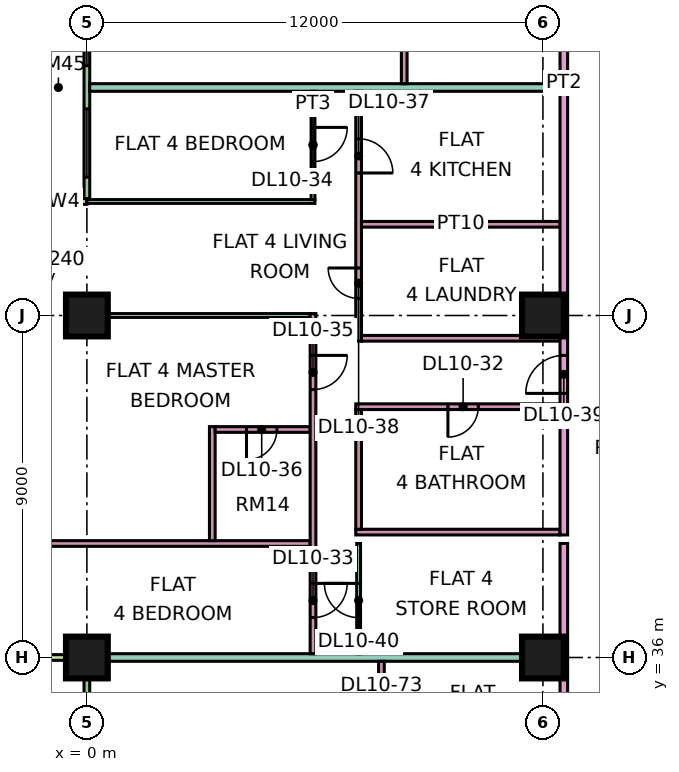
"""IFC4 building model, lengths in metres.
Left out: names, types, materials, properties, quantities, classifications, styles, units other than length and angle.
Written with IfcOpenShell. Run it as: python <this file> out.ifc"""

import sys

from ifc_helpers import new_model, si_unit, direction, frame, frame_2d, origin, origin_2d, place, context, subcontext, project, spatial, rectangle, extrude, element, fill, save


model = new_model("IFC4")
c1 = context("Model", 3, precision=1e-05, world=origin(), true_north=direction((0.0, 1.0)))
c2 = subcontext(c1, "Body", "Model", "MODEL_VIEW")
j1 = project(units=[si_unit("LENGTHUNIT", "METRE"), si_unit("PLANEANGLEUNIT", "RADIAN")], contexts=[c1])
p1 = place(None, origin())
s1 = spatial("IfcSite", under=j1, at=p1, CompositionType="ELEMENT")
p2 = place(p1, origin())
s2 = spatial("IfcBuilding", under=s1, at=p2, CompositionType="ELEMENT")
p3 = place(p2, frame((0.0, 0.0, 52.65)))
s3 = spatial("IfcBuildingStorey", under=s2, at=p3, CompositionType="ELEMENT", Elevation=52.65)
p4 = place(p3, frame((0.0, 36.0, 0.0), z_axis=(0.0, 0.0, 1.0), x_axis=(1.0, 0.0, 0.0)))
e1 = element("IfcColumn", 1, at=p4, inside=s3, PredefinedType="COLUMN", context=c2, shape_type="SweptSolid", body=[
    extrude(rectangle(XDim=1.1, YDim=1.1, at=origin_2d()), origin(), (0.0, 0.0, 1.0), 3.75),
])
p5 = place(p3, frame((0.0, 45.0, 0.0), z_axis=(0.0, 0.0, 1.0), x_axis=(1.0, 0.0, 0.0)))
e2 = element("IfcColumn", 2, at=p5, inside=s3, PredefinedType="COLUMN", context=c2, shape_type="SweptSolid", body=[
    extrude(rectangle(XDim=1.1, YDim=1.1, at=origin_2d()), origin(), (0.0, 0.0, 1.0), 3.75),
])
for number, where, z_axis, x_axis in (
    (3, (12.0, 36.0, 0.0), (0.0, 0.0, 1.0), (1.0, 0.0, 0.0)),
    (4, (12.0, 45.0, 0.0), (0.0, 0.0, 1.0), (1.0, 0.0, 0.0)),
):
    element("IfcColumn", number, at=place(p3, frame(where, z_axis=z_axis, x_axis=x_axis)), inside=s3, PredefinedType="COLUMN", context=c2, shape_type="SweptSolid", body=[
        extrude(rectangle(XDim=1.1, YDim=1.1, at=origin_2d()), origin(), (0.0, 0.0, 1.0), 3.75),
    ])
p6 = place(p3, frame((0.0, 61.425, 0.0), z_axis=(0.0, 0.0, 1.0), x_axis=(0.0, -1.0, 0.0)))
e5 = element("IfcWall", 5, at=p6, inside=s3, PredefinedType="SOLIDWALL", context=c2, shape_type="SweptSolid", body=[
    extrude(rectangle(XDim=13.35, YDim=0.15, at=frame_2d((6.675, 0.0))), origin(), (0.0, 0.0, 1.0), 3.35),
])
p7 = place(p6, frame((1.312, 0.0, 0.0)))
e6 = element("IfcOpeningElement", 6, at=p7, cuts=e5, PredefinedType="OPENING", context=c2, shape_type="SweptSolid", body=[
    extrude(rectangle(XDim=1.8, YDim=2.4, at=frame_2d((0.9, 1.2))), frame((0.0, 0.085, 0.0), z_axis=(0.0, -1.0, 0.0), x_axis=(1.0, 0.0, 0.0)), (0.0, 0.0, 1.0), 0.17),
])
p8 = place(p6, frame((5.0, 0.0, 0.45)))
e7 = element("IfcOpeningElement", 7, at=p8, cuts=e5, PredefinedType="OPENING", context=c2, shape_type="SweptSolid", body=[
    extrude(rectangle(XDim=1.2, YDim=2.4, at=frame_2d((0.6, 1.2))), frame((0.0, 0.085, 0.0), z_axis=(0.0, -1.0, 0.0), x_axis=(1.0, 0.0, 0.0)), (0.0, 0.0, 1.0), 0.17),
])
p9 = place(p6, frame((8.65, 0.0, 0.45)))
e8 = element("IfcOpeningElement", 8, at=p9, cuts=e5, PredefinedType="OPENING", context=c2, shape_type="SweptSolid", body=[
    extrude(rectangle(XDim=1.2, YDim=2.4, at=frame_2d((0.6, 1.2))), frame((0.0, 0.085, 0.0), z_axis=(0.0, -1.0, 0.0), x_axis=(1.0, 0.0, 0.0)), (0.0, 0.0, 1.0), 0.17),
])
p10 = place(p6, frame((10.988, 0.0, 0.45)))
e9 = element("IfcOpeningElement", 9, at=p10, cuts=e5, PredefinedType="OPENING", context=c2, shape_type="SweptSolid", body=[
    extrude(rectangle(XDim=1.8, YDim=2.4, at=frame_2d((0.9, 1.2))), frame((0.0, 0.085, 0.0), z_axis=(0.0, -1.0, 0.0), x_axis=(1.0, 0.0, 0.0)), (0.0, 0.0, 1.0), 0.17),
])
p11 = place(p3, frame((-1.5, 48.0, 0.0), z_axis=(0.0, 0.0, 1.0), x_axis=(1.0, 0.0, 0.0)))
e10 = element("IfcWall", 10, at=p11, inside=s3, PredefinedType="SOLIDWALL", context=c2, shape_type="SweptSolid", body=[
    extrude(rectangle(XDim=1.5, YDim=0.15, at=frame_2d((0.75, 0.0))), origin(), (0.0, 0.0, 1.0), 3.35),
])
p12 = place(p3, frame((0.0, 35.925, 0.0), z_axis=(0.0, 0.0, 1.0), x_axis=(0.0, -1.0, 0.0)))
e11 = element("IfcWall", 11, at=p12, inside=s3, PredefinedType="SOLIDWALL", context=c2, shape_type="SweptSolid", body=[
    extrude(rectangle(XDim=11.85, YDim=0.15, at=frame_2d((5.925, 0.0))), origin(), (0.0, 0.0, 1.0), 3.35),
])
p13 = place(p12, frame((1.15, 0.0, 0.45)))
e12 = element("IfcOpeningElement", 12, at=p13, cuts=e11, PredefinedType="OPENING", context=c2, shape_type="SweptSolid", body=[
    extrude(rectangle(XDim=1.2, YDim=2.4, at=frame_2d((0.6, 1.2))), frame((0.0, 0.085, 0.0), z_axis=(0.0, -1.0, 0.0), x_axis=(1.0, 0.0, 0.0)), (0.0, 0.0, 1.0), 0.17),
])
p14 = place(p12, frame((5.025, 0.0, 0.0)))
e13 = element("IfcOpeningElement", 13, at=p14, cuts=e11, PredefinedType="OPENING", context=c2, shape_type="SweptSolid", body=[
    extrude(rectangle(XDim=1.8, YDim=2.4, at=frame_2d((0.9, 1.2))), frame((0.0, 0.085, 0.0), z_axis=(0.0, -1.0, 0.0), x_axis=(1.0, 0.0, 0.0)), (0.0, 0.0, 1.0), 0.17),
])
p15 = place(p12, frame((9.5, 0.0, 0.45)))
e14 = element("IfcOpeningElement", 14, at=p15, cuts=e11, PredefinedType="OPENING", context=c2, shape_type="SweptSolid", body=[
    extrude(rectangle(XDim=1.2, YDim=2.4, at=frame_2d((0.6, 1.2))), frame((0.0, 0.085, 0.0), z_axis=(0.0, -1.0, 0.0), x_axis=(1.0, 0.0, 0.0)), (0.0, 0.0, 1.0), 0.17),
])
p16 = place(p3, frame((-1.5, 36.0, 0.0), z_axis=(0.0, 0.0, 1.0), x_axis=(1.0, 0.0, 0.0)))
e15 = element("IfcWall", 15, at=p16, inside=s3, PredefinedType="SOLIDWALL", context=c2, shape_type="SweptSolid", body=[
    extrude(rectangle(XDim=1.5, YDim=0.15, at=frame_2d((0.75, 0.0))), origin(), (0.0, 0.0, 1.0), 3.35),
])
p17 = place(p3, frame((-1.351, 39.0, 0.0), z_axis=(0.0, 0.0, 1.0), x_axis=(1.0, 0.0, 0.0)))
e16 = element("IfcWall", 16, at=p17, inside=s3, PredefinedType="PARTITIONING", context=c2, shape_type="SweptSolid", body=[
    extrude(rectangle(XDim=7.226, YDim=0.15, at=frame_2d((3.613, 0.0))), origin(), (0.0, 0.0, 1.0), 3.35),
])
e17 = element("IfcWall", 17, at=p4, inside=s3, PredefinedType="PARTITIONING", context=c2, shape_type="SweptSolid", body=[
    extrude(rectangle(XDim=12.45, YDim=0.2, at=frame_2d((6.225, 0.0))), origin(), (0.0, 0.0, 1.0), 3.35),
])
e18 = element("IfcWall", 18, at=p5, inside=s3, PredefinedType="PARTITIONING", context=c2, shape_type="SweptSolid", body=[
    extrude(rectangle(XDim=5.875, YDim=0.1, at=frame_2d((2.938, 0.0))), origin(), (0.0, 0.0, 1.0), 3.35),
])
p18 = place(p3, frame((0.0, 48.0, 0.0), z_axis=(0.0, 0.0, 1.0), x_axis=(1.0, 0.0, 0.0)))
e19 = element("IfcWall", 19, at=p18, inside=s3, PredefinedType="PARTITIONING", context=c2, shape_type="SweptSolid", body=[
    extrude(rectangle(XDim=6.0, YDim=0.1, at=frame_2d((3.0, 0.0))), origin(), (0.0, 0.0, 1.0), 3.35),
])
p19 = place(p3, frame((0.074, 51.0, 0.0), z_axis=(0.0, 0.0, 1.0), x_axis=(1.0, 0.0, 0.0)))
e20 = element("IfcWall", 20, at=p19, inside=s3, PredefinedType="PARTITIONING", context=c2, shape_type="SweptSolid", body=[
    extrude(rectangle(XDim=12.376, YDim=0.2, at=frame_2d((6.188, 0.0))), origin(), (0.0, 0.0, 1.0), 3.35),
])
p20 = place(p3, frame((3.3, 39.075, 0.0), z_axis=(0.0, 0.0, 1.0), x_axis=(0.0, 1.0, 0.0)))
e21 = element("IfcWall", 21, at=p20, inside=s3, PredefinedType="PARTITIONING", context=c2, shape_type="SweptSolid", body=[
    extrude(rectangle(XDim=3.0, YDim=0.15, at=frame_2d((1.5, 0.0))), origin(), (0.0, 0.0, 1.0), 3.35),
])
p21 = place(p3, frame((3.375, 42.0, 0.0), z_axis=(0.0, 0.0, 1.0), x_axis=(1.0, 0.0, 0.0)))
e22 = element("IfcWall", 22, at=p21, inside=s3, PredefinedType="PARTITIONING", context=c2, shape_type="SweptSolid", body=[
    extrude(rectangle(XDim=2.5, YDim=0.15, at=frame_2d((1.25, 0.0))), origin(), (0.0, 0.0, 1.0), 3.35),
])
p22 = place(p21, frame((0.825, 0.0, 0.0)))
e23 = element("IfcOpeningElement", 23, at=p22, cuts=e22, PredefinedType="OPENING", context=c2, shape_type="SweptSolid", body=[
    extrude(rectangle(XDim=0.8, YDim=2.1, at=frame_2d((0.4, 1.05))), frame((0.0, 0.085, 0.0), z_axis=(0.0, -1.0, 0.0), x_axis=(1.0, 0.0, 0.0)), (0.0, 0.0, 1.0), 0.17),
])
p23 = place(p3, frame((5.95, 36.1, 0.0), z_axis=(0.0, 0.0, 1.0), x_axis=(0.0, 1.0, 0.0)))
e24 = element("IfcWall", 24, at=p23, inside=s3, PredefinedType="PARTITIONING", context=c2, shape_type="SweptSolid", body=[
    extrude(rectangle(XDim=8.95, YDim=0.15, at=frame_2d((4.475, 0.0))), origin(), (0.0, 0.0, 1.0), 3.35),
])
p24 = place(p23, frame((0.95, 0.0, 0.0)))
e25 = element("IfcOpeningElement", 25, at=p24, cuts=e24, PredefinedType="OPENING", context=c2, shape_type="SweptSolid", body=[
    extrude(rectangle(XDim=0.9, YDim=2.1, at=frame_2d((0.45, 1.05))), frame((0.0, 0.085, 0.0), z_axis=(0.0, -1.0, 0.0), x_axis=(1.0, 0.0, 0.0)), (0.0, 0.0, 1.0), 0.17),
])
p25 = place(p23, frame((6.95, 0.0, 0.0)))
e26 = element("IfcOpeningElement", 26, at=p25, cuts=e24, PredefinedType="OPENING", context=c2, shape_type="SweptSolid", body=[
    extrude(rectangle(XDim=0.9, YDim=2.1, at=frame_2d((0.45, 1.05))), frame((0.0, 0.085, 0.0), z_axis=(0.0, -1.0, 0.0), x_axis=(1.0, 0.0, 0.0)), (0.0, 0.0, 1.0), 0.17),
])
p26 = place(p3, frame((5.95, 48.05, 0.0), z_axis=(0.0, 0.0, 1.0), x_axis=(0.0, 1.0, 0.0)))
e27 = element("IfcWall", 27, at=p26, inside=s3, PredefinedType="PARTITIONING", context=c2, shape_type="SweptSolid", body=[
    extrude(rectangle(XDim=2.85, YDim=0.1, at=frame_2d((1.425, 0.0))), origin(), (0.0, 0.0, 1.0), 3.35),
])
p27 = place(p26, frame((1.0, 0.0, 0.0)))
e28 = element("IfcOpeningElement", 28, at=p27, cuts=e27, PredefinedType="OPENING", context=c2, shape_type="SweptSolid", body=[
    extrude(rectangle(XDim=0.9, YDim=2.1, at=frame_2d((0.45, 1.05))), frame((0.0, 0.06, 0.0), z_axis=(0.0, -1.0, 0.0), x_axis=(1.0, 0.0, 0.0)), (0.0, 0.0, 1.0), 0.12),
])
p28 = place(p3, frame((7.075, 39.3, 0.0), z_axis=(0.0, 0.0, 1.0), x_axis=(1.0, 0.0, 0.0)))
e29 = element("IfcWall", 29, at=p28, inside=s3, PredefinedType="PARTITIONING", context=c2, shape_type="SweptSolid", body=[
    extrude(rectangle(XDim=5.375, YDim=0.15, at=frame_2d((2.688, 0.0))), origin(), (0.0, 0.0, 1.0), 3.35),
])
p29 = place(p3, frame((7.075, 42.6, 0.0), z_axis=(0.0, 0.0, 1.0), x_axis=(1.0, 0.0, 0.0)))
e30 = element("IfcWall", 30, at=p29, inside=s3, PredefinedType="PARTITIONING", context=c2, shape_type="SweptSolid", body=[
    extrude(rectangle(XDim=5.375, YDim=0.15, at=frame_2d((2.688, 0.0))), origin(), (0.0, 0.0, 1.0), 3.35),
])
p30 = place(p29, frame((2.425, 0.0, 0.0)))
e31 = element("IfcOpeningElement", 31, at=p30, cuts=e30, PredefinedType="OPENING", context=c2, shape_type="SweptSolid", body=[
    extrude(rectangle(XDim=0.8, YDim=2.1, at=frame_2d((0.4, 1.05))), frame((0.0, 0.085, 0.0), z_axis=(0.0, -1.0, 0.0), x_axis=(1.0, 0.0, 0.0)), (0.0, 0.0, 1.0), 0.17),
])
p31 = place(p3, frame((7.15, 36.1, 0.0), z_axis=(0.0, 0.0, 1.0), x_axis=(0.0, 1.0, 0.0)))
e32 = element("IfcWall", 32, at=p31, inside=s3, PredefinedType="PARTITIONING", context=c2, shape_type="SweptSolid", body=[
    extrude(rectangle(XDim=2.9, YDim=0.1, at=frame_2d((1.45, 0.0))), origin(), (0.0, 0.0, 1.0), 3.35),
])
p32 = place(p31, frame((0.95, 0.0, 0.0)))
e33 = element("IfcOpeningElement", 33, at=p32, cuts=e32, PredefinedType="OPENING", context=c2, shape_type="SweptSolid", body=[
    extrude(rectangle(XDim=0.9, YDim=2.1, at=frame_2d((0.45, 1.05))), frame((0.0, 0.06, 0.0), z_axis=(0.0, -1.0, 0.0), x_axis=(1.0, 0.0, 0.0)), (0.0, 0.0, 1.0), 0.12),
])
p33 = place(p3, frame((7.15, 39.375, 0.0), z_axis=(0.0, 0.0, 1.0), x_axis=(0.0, 1.0, 0.0)))
e34 = element("IfcWall", 34, at=p33, inside=s3, PredefinedType="PARTITIONING", context=c2, shape_type="SweptSolid", body=[
    extrude(rectangle(XDim=3.15, YDim=0.15, at=frame_2d((1.575, 0.0))), origin(), (0.0, 0.0, 1.0), 3.35),
])
p34 = place(p3, frame((7.15, 44.325, 0.0), z_axis=(0.0, 0.0, 1.0), x_axis=(0.0, 1.0, 0.0)))
e35 = element("IfcWall", 35, at=p34, inside=s3, PredefinedType="PARTITIONING", context=c2, shape_type="SweptSolid", body=[
    extrude(rectangle(XDim=6.575, YDim=0.15, at=frame_2d((3.288, 0.0))), origin(), (0.0, 0.0, 1.0), 3.35),
])
p35 = place(p34, frame((4.425, 0.0, 0.0)))
e36 = element("IfcOpeningElement", 36, at=p35, cuts=e35, PredefinedType="OPENING", context=c2, shape_type="SweptSolid", body=[
    extrude(rectangle(XDim=0.9, YDim=2.1, at=frame_2d((0.45, 1.05))), frame((0.0, 0.085, 0.0), z_axis=(0.0, -1.0, 0.0), x_axis=(1.0, 0.0, 0.0)), (0.0, 0.0, 1.0), 0.17),
])
p36 = place(p34, frame((1.125, 0.0, 0.0)))
e37 = element("IfcOpeningElement", 37, at=p36, cuts=e35, PredefinedType="OPENING", context=c2, shape_type="SweptSolid", body=[
    extrude(rectangle(XDim=0.8, YDim=2.1, at=frame_2d((0.4, 1.05))), frame((0.0, 0.085, 0.0), z_axis=(0.0, -1.0, 0.0), x_axis=(1.0, 0.0, 0.0)), (0.0, 0.0, 1.0), 0.17),
])
for number, where, z_axis, x_axis in (
    (38, (7.225, 44.4, 0.0), (0.0, 0.0, 1.0), (1.0, 0.0, 0.0)),
    (39, (7.225, 47.4, 0.0), (0.0, 0.0, 1.0), (1.0, 0.0, 0.0)),
):
    element("IfcWall", number, at=place(p3, frame(where, z_axis=z_axis, x_axis=x_axis)), inside=s3, PredefinedType="PARTITIONING", context=c2, shape_type="SweptSolid", body=[
        extrude(rectangle(XDim=5.225, YDim=0.15, at=frame_2d((2.612, 0.0))), origin(), (0.0, 0.0, 1.0), 3.35),
    ])
p37 = place(p3, frame((7.75, 26.625, 0.0), z_axis=(0.0, 0.0, 1.0), x_axis=(0.0, 1.0, 0.0)))
e40 = element("IfcWall", 40, at=p37, inside=s3, PredefinedType="PARTITIONING", context=c2, shape_type="SweptSolid", body=[
    extrude(rectangle(XDim=9.275, YDim=0.15, at=frame_2d((4.637, 0.0))), origin(), (0.0, 0.0, 1.0), 3.35),
])
p38 = place(p37, frame((4.875, 0.0, 0.0)))
e41 = element("IfcOpeningElement", 41, at=p38, cuts=e40, PredefinedType="OPENING", context=c2, shape_type="SweptSolid", body=[
    extrude(rectangle(XDim=0.9, YDim=2.1, at=frame_2d((0.45, 1.05))), frame((0.0, 0.085, 0.0), z_axis=(0.0, -1.0, 0.0), x_axis=(1.0, 0.0, 0.0)), (0.0, 0.0, 1.0), 0.17),
])
p39 = place(p37, frame((7.575, 0.0, 0.0)))
e42 = element("IfcOpeningElement", 42, at=p39, cuts=e40, PredefinedType="OPENING", context=c2, shape_type="SweptSolid", body=[
    extrude(rectangle(XDim=0.9, YDim=2.1, at=frame_2d((0.45, 1.05))), frame((0.0, 0.085, 0.0), z_axis=(0.0, -1.0, 0.0), x_axis=(1.0, 0.0, 0.0)), (0.0, 0.0, 1.0), 0.17),
])
p40 = place(p3, frame((8.35, 51.1, 0.0), z_axis=(0.0, 0.0, 1.0), x_axis=(0.0, 1.0, 0.0)))
e43 = element("IfcWall", 43, at=p40, inside=s3, PredefinedType="PARTITIONING", context=c2, shape_type="SweptSolid", body=[
    extrude(rectangle(XDim=8.975, YDim=0.15, at=frame_2d((4.487, 0.0))), origin(), (0.0, 0.0, 1.0), 3.35),
])
p41 = place(p40, frame((6.95, 0.0, 0.0)))
e44 = element("IfcOpeningElement", 44, at=p41, cuts=e43, PredefinedType="OPENING", context=c2, shape_type="SweptSolid", body=[
    extrude(rectangle(XDim=0.8, YDim=2.1, at=frame_2d((0.4, 1.05))), frame((0.0, 0.085, 0.0), z_axis=(0.0, -1.0, 0.0), x_axis=(1.0, 0.0, 0.0)), (0.0, 0.0, 1.0), 0.17),
])
p42 = place(p40, frame((2.45, 0.0, 0.0)))
e45 = element("IfcOpeningElement", 45, at=p42, cuts=e43, PredefinedType="OPENING", context=c2, shape_type="SweptSolid", body=[
    extrude(rectangle(XDim=0.9, YDim=2.1, at=frame_2d((0.45, 1.05))), frame((0.0, 0.085, 0.0), z_axis=(0.0, -1.0, 0.0), x_axis=(1.0, 0.0, 0.0)), (0.0, 0.0, 1.0), 0.17),
])
p43 = place(p3, frame((12.55, 20.0, 0.0), z_axis=(0.0, 0.0, 1.0), x_axis=(0.0, 1.0, 0.0)))
e46 = element("IfcWall", 46, at=p43, inside=s3, PredefinedType="PARTITIONING", context=c2, shape_type="SweptSolid", body=[
    extrude(rectangle(XDim=19.0, YDim=0.2, at=frame_2d((9.5, 0.0))), origin(), (0.0, 0.0, 1.0), 3.35),
])
p44 = place(p43, frame((0.6, 0.0, 0.0)))
e47 = element("IfcOpeningElement", 47, at=p44, cuts=e46, PredefinedType="OPENING", context=c2, shape_type="SweptSolid", body=[
    extrude(rectangle(XDim=1.2, YDim=2.1, at=frame_2d((0.6, 1.05))), frame((0.0, 0.11, 0.0), z_axis=(0.0, -1.0, 0.0), x_axis=(1.0, 0.0, 0.0)), (0.0, 0.0, 1.0), 0.22),
])
p45 = place(p43, frame((4.65, 0.0, 0.0)))
e48 = element("IfcOpeningElement", 48, at=p45, cuts=e46, PredefinedType="OPENING", context=c2, shape_type="SweptSolid", body=[
    extrude(rectangle(XDim=1.0, YDim=2.1, at=frame_2d((0.5, 1.05))), frame((0.0, 0.11, 0.0), z_axis=(0.0, -1.0, 0.0), x_axis=(1.0, 0.0, 0.0)), (0.0, 0.0, 1.0), 0.22),
])
p46 = place(p3, frame((12.55, 39.225, 0.0), z_axis=(0.0, 0.0, 1.0), x_axis=(0.0, 1.0, 0.0)))
e49 = element("IfcWall", 49, at=p46, inside=s3, PredefinedType="PARTITIONING", context=c2, shape_type="SweptSolid", body=[
    extrude(rectangle(XDim=23.775, YDim=0.2, at=frame_2d((11.887, 0.0))), origin(), (0.0, 0.0, 1.0), 3.35),
])
p47 = place(p46, frame((3.725, 0.0, 0.0)))
e50 = element("IfcOpeningElement", 50, at=p47, cuts=e49, PredefinedType="OPENING", context=c2, shape_type="SweptSolid", body=[
    extrude(rectangle(XDim=1.0, YDim=2.1, at=frame_2d((0.5, 1.05))), frame((0.0, 0.11, 0.0), z_axis=(0.0, -1.0, 0.0), x_axis=(1.0, 0.0, 0.0)), (0.0, 0.0, 1.0), 0.22),
])
p48 = place(p46, frame((21.725, 0.0, 0.0)))
e51 = element("IfcOpeningElement", 51, at=p48, cuts=e49, PredefinedType="OPENING", context=c2, shape_type="SweptSolid", body=[
    extrude(rectangle(XDim=1.0, YDim=2.1, at=frame_2d((0.5, 1.05))), frame((0.0, 0.11, 0.0), z_axis=(0.0, -1.0, 0.0), x_axis=(1.0, 0.0, 0.0)), (0.0, 0.0, 1.0), 0.22),
])
p49 = place(p9, origin())
e52 = element("IfcWindow", 52, at=p49, inside=s3, PartitioningType="SINGLE_PANEL", PredefinedType="WINDOW", context=c2, shape_type="SweptSolid", body=[
    extrude(rectangle(XDim=1.2, YDim=2.4, at=frame_2d((0.6, 1.2))), frame((0.0, 0.03, 0.0), z_axis=(0.0, -1.0, 0.0), x_axis=(1.0, 0.0, 0.0)), (0.0, 0.0, 1.0), 0.06),
])
fill(e8, e52)
p50 = place(p10, origin())
e53 = element("IfcWindow", 53, at=p50, inside=s3, PartitioningType="SINGLE_PANEL", PredefinedType="WINDOW", context=c2, shape_type="SweptSolid", body=[
    extrude(rectangle(XDim=1.8, YDim=2.4, at=frame_2d((0.9, 1.2))), frame((0.0, 0.03, 0.0), z_axis=(0.0, -1.0, 0.0), x_axis=(1.0, 0.0, 0.0)), (0.0, 0.0, 1.0), 0.06),
])
fill(e9, e53)
p51 = place(p30, frame((0.8, 0.0, 0.0), z_axis=(0.0, 0.0, 1.0), x_axis=(-1.0, 0.0, 0.0)))
e54 = element("IfcDoor", 54, at=p51, inside=s3, OperationType="SINGLE_SWING_LEFT", PredefinedType="DOOR", context=c2, shape_type="SweptSolid", body=[
    extrude(rectangle(XDim=0.8, YDim=2.1, at=frame_2d((0.4, 1.05))), frame((0.0, 0.025, 0.0), z_axis=(0.0, -1.0, 0.0), x_axis=(1.0, 0.0, 0.0)), (0.0, 0.0, 1.0), 0.05),
])
fill(e31, e54)
p52 = place(p24, origin())
e55 = element("IfcDoor", 55, at=p52, inside=s3, OperationType="SINGLE_SWING_RIGHT", PredefinedType="DOOR", context=c2, shape_type="SweptSolid", body=[
    extrude(rectangle(XDim=0.9, YDim=2.1, at=frame_2d((0.45, 1.05))), frame((0.0, 0.025, 0.0), z_axis=(0.0, -1.0, 0.0), x_axis=(1.0, 0.0, 0.0)), (0.0, 0.0, 1.0), 0.05),
])
fill(e25, e55)
p53 = place(p27, origin())
e56 = element("IfcDoor", 56, at=p53, inside=s3, OperationType="SINGLE_SWING_RIGHT", PredefinedType="DOOR", context=c2, shape_type="SweptSolid", body=[
    extrude(rectangle(XDim=0.9, YDim=2.1, at=frame_2d((0.45, 1.05))), frame((0.0, 0.025, 0.0), z_axis=(0.0, -1.0, 0.0), x_axis=(1.0, 0.0, 0.0)), (0.0, 0.0, 1.0), 0.05),
])
fill(e28, e56)
p54 = place(p25, origin())
e57 = element("IfcDoor", 57, at=p54, inside=s3, OperationType="SINGLE_SWING_RIGHT", PredefinedType="DOOR", context=c2, shape_type="SweptSolid", body=[
    extrude(rectangle(XDim=0.9, YDim=2.1, at=frame_2d((0.45, 1.05))), frame((0.0, 0.025, 0.0), z_axis=(0.0, -1.0, 0.0), x_axis=(1.0, 0.0, 0.0)), (0.0, 0.0, 1.0), 0.05),
])
fill(e26, e57)
p55 = place(p22, frame((0.8, 0.0, 0.0), z_axis=(0.0, 0.0, 1.0), x_axis=(-1.0, 0.0, 0.0)))
e58 = element("IfcDoor", 58, at=p55, inside=s3, OperationType="SINGLE_SWING_LEFT", PredefinedType="DOOR", context=c2, shape_type="SweptSolid", body=[
    extrude(rectangle(XDim=0.8, YDim=2.1, at=frame_2d((0.4, 1.05))), frame((0.0, 0.025, 0.0), z_axis=(0.0, -1.0, 0.0), x_axis=(1.0, 0.0, 0.0)), (0.0, 0.0, 1.0), 0.05),
])
fill(e23, e58)
p56 = place(p35, frame((0.9, 0.0, 0.0), z_axis=(0.0, 0.0, 1.0), x_axis=(-1.0, 0.0, 0.0)))
e59 = element("IfcDoor", 59, at=p56, inside=s3, OperationType="SINGLE_SWING_LEFT", PredefinedType="DOOR", context=c2, shape_type="SweptSolid", body=[
    extrude(rectangle(XDim=0.9, YDim=2.1, at=frame_2d((0.45, 1.05))), frame((0.0, 0.025, 0.0), z_axis=(0.0, -1.0, 0.0), x_axis=(1.0, 0.0, 0.0)), (0.0, 0.0, 1.0), 0.05),
])
fill(e36, e59)
p57 = place(p36, frame((0.8, 0.0, 0.0), z_axis=(0.0, 0.0, 1.0), x_axis=(-1.0, 0.0, 0.0)))
e60 = element("IfcDoor", 60, at=p57, inside=s3, OperationType="SINGLE_SWING_RIGHT", PredefinedType="DOOR", context=c2, shape_type="SweptSolid", body=[
    extrude(rectangle(XDim=0.8, YDim=2.1, at=frame_2d((0.4, 1.05))), frame((0.0, 0.025, 0.0), z_axis=(0.0, -1.0, 0.0), x_axis=(1.0, 0.0, 0.0)), (0.0, 0.0, 1.0), 0.05),
])
fill(e37, e60)
p58 = place(p47, origin())
e61 = element("IfcDoor", 61, at=p58, inside=s3, OperationType="SINGLE_SWING_LEFT", PredefinedType="DOOR", context=c2, shape_type="SweptSolid", body=[
    extrude(rectangle(XDim=1.0, YDim=2.1, at=frame_2d((0.5, 1.05))), frame((0.0, 0.025, 0.0), z_axis=(0.0, -1.0, 0.0), x_axis=(1.0, 0.0, 0.0)), (0.0, 0.0, 1.0), 0.05),
])
fill(e50, e61)
p59 = place(p32, frame((0.9, 0.0, 0.0), z_axis=(0.0, 0.0, 1.0), x_axis=(-1.0, 0.0, 0.0)))
e62 = element("IfcDoor", 62, at=p59, inside=s3, OperationType="SINGLE_SWING_RIGHT", PredefinedType="DOOR", context=c2, shape_type="SweptSolid", body=[
    extrude(rectangle(XDim=0.9, YDim=2.1, at=frame_2d((0.45, 1.05))), frame((0.0, 0.025, 0.0), z_axis=(0.0, -1.0, 0.0), x_axis=(1.0, 0.0, 0.0)), (0.0, 0.0, 1.0), 0.05),
])
fill(e33, e62)
p60 = place(p39, frame((0.9, 0.0, 0.0), z_axis=(0.0, 0.0, 1.0), x_axis=(-1.0, 0.0, 0.0)))
e63 = element("IfcDoor", 63, at=p60, inside=s3, OperationType="SINGLE_SWING_LEFT", PredefinedType="DOOR", context=c2, shape_type="SweptSolid", body=[
    extrude(rectangle(XDim=0.9, YDim=2.1, at=frame_2d((0.45, 1.05))), frame((0.0, 0.025, 0.0), z_axis=(0.0, -1.0, 0.0), x_axis=(1.0, 0.0, 0.0)), (0.0, 0.0, 1.0), 0.05),
])
fill(e42, e63)
save(model, sys.argv[1])
